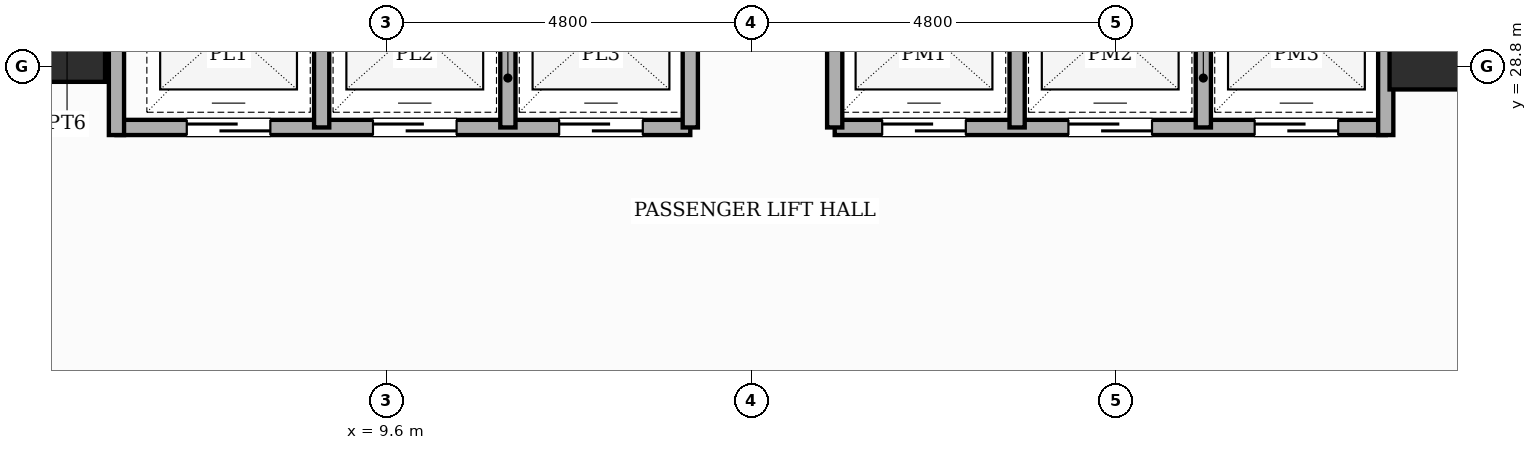
"""IFC4 building model, lengths in metres.
Left out: names, types, materials, properties, quantities, classifications, styles, units other than length and angle.
Written with IfcOpenShell. Run it as: python <this file> out.ifc"""

import sys

from ifc_helpers import new_model, si_unit, direction, frame, frame_2d, origin, origin_2d, place, context, subcontext, project, spatial, rectangle, extrude, element, fill, save


model = new_model("IFC4")
c1 = context("Model", 3, precision=1e-05, world=origin(), true_north=direction((0.0, 1.0)))
c2 = subcontext(c1, "Body", "Model", "MODEL_VIEW")
j1 = project(units=[si_unit("LENGTHUNIT", "METRE"), si_unit("PLANEANGLEUNIT", "RADIAN")], contexts=[c1])
p1 = place(None, origin())
s1 = spatial("IfcSite", under=j1, at=p1, CompositionType="ELEMENT")
p2 = place(p1, origin())
s2 = spatial("IfcBuilding", under=s1, at=p2, CompositionType="ELEMENT")
p3 = place(p2, frame((0.0, 0.0, -4.4)))
s3 = spatial("IfcBuildingStorey", under=s2, at=p3, CompositionType="ELEMENT", Elevation=-4.4)
p4 = place(p3, frame((5.25, 29.25, 0.0), z_axis=(0.0, 0.0, 1.0), x_axis=(1.0, 0.0, 0.0)))
e1 = element("IfcColumn", 1, at=p4, inside=s3, PredefinedType="COLUMN", context=c2, shape_type="SweptSolid", body=[
    extrude(rectangle(XDim=1.3, YDim=1.3, at=origin_2d()), origin(), (0.0, 0.0, 1.0), 4.4),
])
p5 = place(p3, frame((23.55, 29.25, 0.0), z_axis=(0.0, 0.0, 1.0), x_axis=(1.0, 0.0, 0.0)))
e2 = element("IfcColumn", 2, at=p5, inside=s3, PredefinedType="USERDEFINED", context=c2, shape_type="SweptSolid", body=[
    extrude(rectangle(XDim=1.5, YDim=1.5, at=origin_2d()), origin(), (0.0, 0.0, 1.0), 4.4),
])
p6 = place(p3, frame((6.05, 28.0, 0.0), z_axis=(0.0, 0.0, 1.0), x_axis=(1.0, 0.0, 0.0)))
e3 = element("IfcWall", 3, at=p6, inside=s3, PredefinedType="POLYGONAL", context=c2, shape_type="SweptSolid", body=[
    extrude(rectangle(XDim=7.55, YDim=0.2, at=frame_2d((3.775, 0.0))), origin(), (0.0, 0.0, 1.0), 4.05),
])
p7 = place(p6, frame((0.925, 0.0, 0.0)))
e4 = element("IfcOpeningElement", 4, at=p7, cuts=e3, PredefinedType="OPENING", context=c2, shape_type="SweptSolid", body=[
    extrude(rectangle(XDim=1.1, YDim=2.15, at=frame_2d((0.55, 1.075))), frame((0.0, 0.11, 0.0), z_axis=(0.0, -1.0, 0.0), x_axis=(1.0, 0.0, 0.0)), (0.0, 0.0, 1.0), 0.22),
])
p8 = place(p6, frame((3.375, 0.0, 0.0)))
e5 = element("IfcOpeningElement", 5, at=p8, cuts=e3, PredefinedType="OPENING", context=c2, shape_type="SweptSolid", body=[
    extrude(rectangle(XDim=1.1, YDim=2.15, at=frame_2d((0.55, 1.075))), frame((0.0, 0.11, 0.0), z_axis=(0.0, -1.0, 0.0), x_axis=(1.0, 0.0, 0.0)), (0.0, 0.0, 1.0), 0.22),
])
p9 = place(p6, frame((5.825, 0.0, 0.0)))
e6 = element("IfcOpeningElement", 6, at=p9, cuts=e3, PredefinedType="OPENING", context=c2, shape_type="SweptSolid", body=[
    extrude(rectangle(XDim=1.1, YDim=2.15, at=frame_2d((0.55, 1.075))), frame((0.0, 0.11, 0.0), z_axis=(0.0, -1.0, 0.0), x_axis=(1.0, 0.0, 0.0)), (0.0, 0.0, 1.0), 0.22),
])
p10 = place(p3, frame((15.5, 28.0, 0.0), z_axis=(0.0, 0.0, 1.0), x_axis=(1.0, 0.0, 0.0)))
e7 = element("IfcWall", 7, at=p10, inside=s3, PredefinedType="POLYGONAL", context=c2, shape_type="SweptSolid", body=[
    extrude(rectangle(XDim=7.25, YDim=0.2, at=frame_2d((3.625, 0.0))), origin(), (0.0, 0.0, 1.0), 4.05),
])
p11 = place(p10, frame((0.625, 0.0, 0.0)))
e8 = element("IfcOpeningElement", 8, at=p11, cuts=e7, PredefinedType="OPENING", context=c2, shape_type="SweptSolid", body=[
    extrude(rectangle(XDim=1.1, YDim=2.15, at=frame_2d((0.55, 1.075))), frame((0.0, 0.11, 0.0), z_axis=(0.0, -1.0, 0.0), x_axis=(1.0, 0.0, 0.0)), (0.0, 0.0, 1.0), 0.22),
])
p12 = place(p10, frame((3.075, 0.0, 0.0)))
e9 = element("IfcOpeningElement", 9, at=p12, cuts=e7, PredefinedType="OPENING", context=c2, shape_type="SweptSolid", body=[
    extrude(rectangle(XDim=1.1, YDim=2.15, at=frame_2d((0.55, 1.075))), frame((0.0, 0.11, 0.0), z_axis=(0.0, -1.0, 0.0), x_axis=(1.0, 0.0, 0.0)), (0.0, 0.0, 1.0), 0.22),
])
p13 = place(p10, frame((5.525, 0.0, 0.0)))
e10 = element("IfcOpeningElement", 10, at=p13, cuts=e7, PredefinedType="OPENING", context=c2, shape_type="SweptSolid", body=[
    extrude(rectangle(XDim=1.1, YDim=2.15, at=frame_2d((0.55, 1.075))), frame((0.0, 0.11, 0.0), z_axis=(0.0, -1.0, 0.0), x_axis=(1.0, 0.0, 0.0)), (0.0, 0.0, 1.0), 0.22),
])
for number, where, z_axis, x_axis in (
    (11, (6.05, 27.9, 0.0), (0.0, 0.0, 1.0), (0.0, 1.0, 0.0)),
    (12, (22.75, 27.9, 0.0), (0.0, 0.0, 1.0), (0.0, 1.0, 0.0)),
):
    element("IfcWall", number, at=place(p3, frame(where, z_axis=z_axis, x_axis=x_axis)), inside=s3, PredefinedType="POLYGONAL", context=c2, shape_type="SweptSolid", body=[
        extrude(rectangle(XDim=3.0, YDim=0.2, at=frame_2d((1.5, 0.0))), origin(), (0.0, 0.0, 1.0), 4.05),
    ])
for number, where, z_axis, x_axis in (
    (13, (13.6, 28.0, 0.0), (0.0, 0.0, 1.0), (0.0, 1.0, 0.0)),
    (14, (15.5, 28.0, 0.0), (0.0, 0.0, 1.0), (0.0, 1.0, 0.0)),
    (15, (8.75, 28.0, 0.0), (0.0, 0.0, 1.0), (0.0, 1.0, 0.0)),
    (16, (11.2, 28.0, 0.0), (0.0, 0.0, 1.0), (0.0, 1.0, 0.0)),
    (17, (17.9, 28.0, 0.0), (0.0, 0.0, 1.0), (0.0, 1.0, 0.0)),
    (18, (20.35, 28.0, 0.0), (0.0, 0.0, 1.0), (0.0, 1.0, 0.0)),
):
    element("IfcWall", number, at=place(p3, frame(where, z_axis=z_axis, x_axis=x_axis)), inside=s3, PredefinedType="POLYGONAL", context=c2, shape_type="SweptSolid", body=[
        extrude(rectangle(XDim=2.9, YDim=0.2, at=frame_2d((1.45, 0.0))), origin(), (0.0, 0.0, 1.0), 4.05),
    ])
p14 = place(p7, origin())
e19 = element("IfcDoor", 19, at=p14, inside=s3, OperationType="SLIDING_TO_LEFT", PredefinedType="DOOR", context=c2, shape_type="SweptSolid", body=[
    extrude(rectangle(XDim=1.1, YDim=2.15, at=frame_2d((0.55, 1.075))), frame((0.0, 0.025, 0.0), z_axis=(0.0, -1.0, 0.0), x_axis=(1.0, 0.0, 0.0)), (0.0, 0.0, 1.0), 0.05),
])
fill(e4, e19)
p15 = place(p8, origin())
e20 = element("IfcDoor", 20, at=p15, inside=s3, OperationType="SLIDING_TO_RIGHT", PredefinedType="DOOR", context=c2, shape_type="SweptSolid", body=[
    extrude(rectangle(XDim=1.1, YDim=2.15, at=frame_2d((0.55, 1.075))), frame((0.0, 0.025, 0.0), z_axis=(0.0, -1.0, 0.0), x_axis=(1.0, 0.0, 0.0)), (0.0, 0.0, 1.0), 0.05),
])
fill(e5, e20)
p16 = place(p9, origin())
e21 = element("IfcDoor", 21, at=p16, inside=s3, OperationType="SLIDING_TO_LEFT", PredefinedType="DOOR", context=c2, shape_type="SweptSolid", body=[
    extrude(rectangle(XDim=1.1, YDim=2.15, at=frame_2d((0.55, 1.075))), frame((0.0, 0.025, 0.0), z_axis=(0.0, -1.0, 0.0), x_axis=(1.0, 0.0, 0.0)), (0.0, 0.0, 1.0), 0.05),
])
fill(e6, e21)
p17 = place(p11, origin())
e22 = element("IfcDoor", 22, at=p17, inside=s3, OperationType="SLIDING_TO_RIGHT", PredefinedType="DOOR", context=c2, shape_type="SweptSolid", body=[
    extrude(rectangle(XDim=1.1, YDim=2.15, at=frame_2d((0.55, 1.075))), frame((0.0, 0.025, 0.0), z_axis=(0.0, -1.0, 0.0), x_axis=(1.0, 0.0, 0.0)), (0.0, 0.0, 1.0), 0.05),
])
fill(e8, e22)
p18 = place(p12, origin())
e23 = element("IfcDoor", 23, at=p18, inside=s3, OperationType="SLIDING_TO_LEFT", PredefinedType="DOOR", context=c2, shape_type="SweptSolid", body=[
    extrude(rectangle(XDim=1.1, YDim=2.15, at=frame_2d((0.55, 1.075))), frame((0.0, 0.025, 0.0), z_axis=(0.0, -1.0, 0.0), x_axis=(1.0, 0.0, 0.0)), (0.0, 0.0, 1.0), 0.05),
])
fill(e9, e23)
p19 = place(p13, origin())
e24 = element("IfcDoor", 24, at=p19, inside=s3, OperationType="SLIDING_TO_RIGHT", PredefinedType="DOOR", context=c2, shape_type="SweptSolid", body=[
    extrude(rectangle(XDim=1.1, YDim=2.15, at=frame_2d((0.55, 1.075))), frame((0.0, 0.025, 0.0), z_axis=(0.0, -1.0, 0.0), x_axis=(1.0, 0.0, 0.0)), (0.0, 0.0, 1.0), 0.05),
])
fill(e10, e24)
save(model, sys.argv[1])
